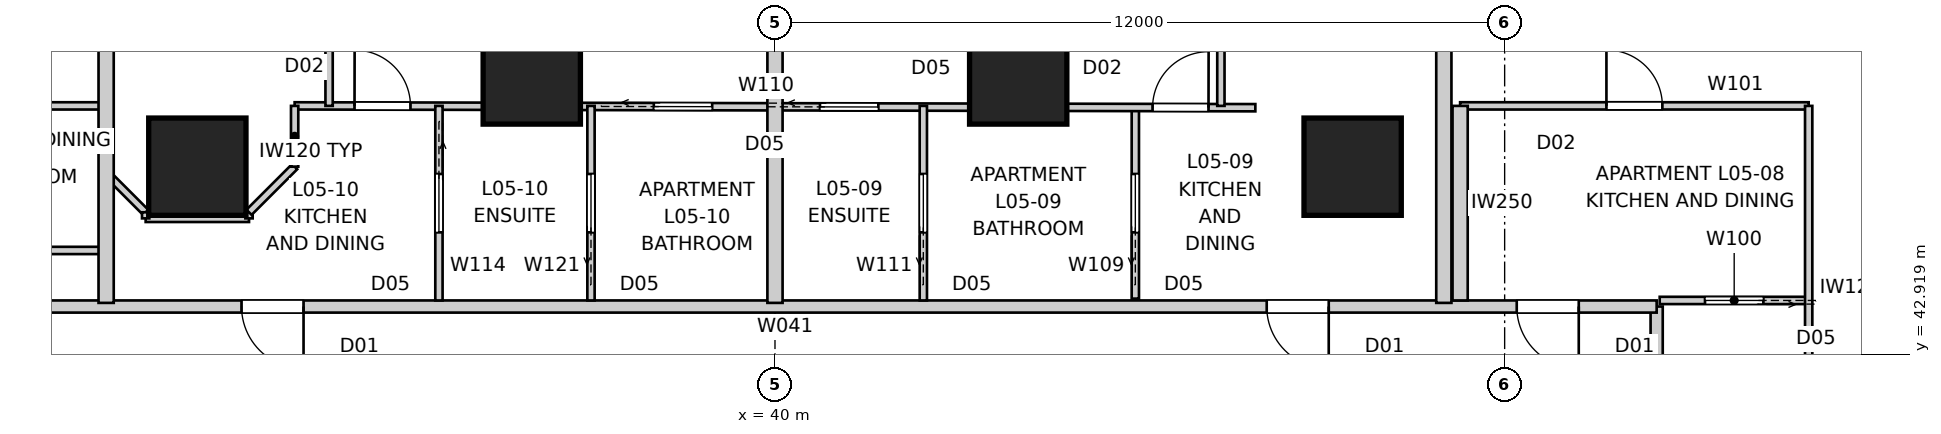
"""IFC4 building model, lengths in metres.
Left out: names, types, materials, properties, quantities, classifications, styles, units other than length and angle.
Written with IfcOpenShell. Run it as: python <this file> out.ifc"""

import sys

from ifc_helpers import new_model, si_unit, direction, frame, frame_2d, origin, origin_2d, place, context, subcontext, project, spatial, rectangle, extrude, element, fill, save


model = new_model("IFC4")
c1 = context("Model", 3, precision=1e-05, world=origin(), true_north=direction((0.0, 1.0)))
c2 = subcontext(c1, "Body", "Model", "MODEL_VIEW")
j1 = project(units=[si_unit("LENGTHUNIT", "METRE"), si_unit("PLANEANGLEUNIT", "RADIAN")], contexts=[c1])
p1 = place(None, origin())
s1 = spatial("IfcSite", under=j1, at=p1, CompositionType="ELEMENT")
p2 = place(p1, origin())
s2 = spatial("IfcBuilding", under=s1, at=p2, CompositionType="ELEMENT")
p3 = place(p2, frame((0.0, 0.0, 21.8)))
s3 = spatial("IfcBuildingStorey", under=s2, at=p3, CompositionType="ELEMENT", Elevation=21.8)
for number, where, z_axis, x_axis in (
    (1, (49.5, 46.0, 0.0), (0.0, 0.0, 1.0), (1.0, 0.0, 0.0)),
    (2, (44.0, 47.5, 0.0), (0.0, 0.0, 1.0), (1.0, 0.0, 0.0)),
    (3, (36.0, 47.5, 0.0), (0.0, 0.0, 1.0), (1.0, 0.0, 0.0)),
    (4, (30.5, 46.0, 0.0), (0.0, 0.0, 1.0), (1.0, 0.0, 0.0)),
):
    element("IfcColumn", number, at=place(p3, frame(where, z_axis=z_axis, x_axis=x_axis)), inside=s3, PredefinedType="COLUMN", context=c2, shape_type="SweptSolid", body=[
        extrude(rectangle(XDim=1.6, YDim=1.6, at=origin_2d()), origin(), (0.0, 0.0, 1.0), 3.4),
    ])
p4 = place(p3, frame((54.5, 16.3, 0.0), z_axis=(0.0, 0.0, 1.0), x_axis=(0.0, 1.0, 0.0)))
e5 = element("IfcWall", 5, at=p4, inside=s3, PredefinedType="PARTITIONING", context=c2, shape_type="SweptSolid", body=[
    extrude(rectangle(XDim=27.4, YDim=0.2, at=frame_2d((13.7, 0.0))), origin(), (0.0, 0.0, 1.0), 3.25),
])
p5 = place(p4, frame((20.998, 0.0, 0.0)))
e6 = element("IfcOpeningElement", 6, at=p5, cuts=e5, PredefinedType="OPENING", context=c2, shape_type="SweptSolid", body=[
    extrude(rectangle(XDim=1.02, YDim=2.34, at=frame_2d((0.51, 1.17))), frame((0.0, 0.11, 0.0), z_axis=(0.0, -1.0, 0.0), x_axis=(1.0, 0.0, 0.0)), (0.0, 0.0, 1.0), 0.22),
])
p6 = place(p4, frame((11.119, 0.0, 0.0)))
e7 = element("IfcOpeningElement", 7, at=p6, cuts=e5, PredefinedType="OPENING", context=c2, shape_type="SweptSolid", body=[
    extrude(rectangle(XDim=1.02, YDim=2.34, at=frame_2d((0.51, 1.17))), frame((0.0, 0.11, 0.0), z_axis=(0.0, -1.0, 0.0), x_axis=(1.0, 0.0, 0.0)), (0.0, 0.0, 1.0), 0.22),
])
p7 = place(p4, frame((1.015, 0.0, 0.0)))
e8 = element("IfcOpeningElement", 8, at=p7, cuts=e5, PredefinedType="OPENING", context=c2, shape_type="SweptSolid", body=[
    extrude(rectangle(XDim=1.02, YDim=2.34, at=frame_2d((0.51, 1.17))), frame((0.0, 0.11, 0.0), z_axis=(0.0, -1.0, 0.0), x_axis=(1.0, 0.0, 0.0)), (0.0, 0.0, 1.0), 0.22),
])
p8 = place(p3, frame((54.5, 43.7, 0.0), z_axis=(0.0, 0.0, 1.0), x_axis=(-1.0, 0.0, 0.0)))
e9 = element("IfcWall", 9, at=p8, inside=s3, PredefinedType="PARTITIONING", context=c2, shape_type="SweptSolid", body=[
    extrude(rectangle(XDim=29.0, YDim=0.2, at=frame_2d((14.5, 0.0))), origin(), (0.0, 0.0, 1.0), 3.25),
])
p9 = place(p8, frame((22.253, 0.0, 0.0)))
e10 = element("IfcOpeningElement", 10, at=p9, cuts=e9, PredefinedType="OPENING", context=c2, shape_type="SweptSolid", body=[
    extrude(rectangle(XDim=1.02, YDim=2.34, at=frame_2d((0.51, 1.17))), frame((0.0, 0.11, 0.0), z_axis=(0.0, -1.0, 0.0), x_axis=(1.0, 0.0, 0.0)), (0.0, 0.0, 1.0), 0.22),
])
p10 = place(p8, frame((5.393, 0.0, 0.0)))
e11 = element("IfcOpeningElement", 11, at=p10, cuts=e9, PredefinedType="OPENING", context=c2, shape_type="SweptSolid", body=[
    extrude(rectangle(XDim=1.02, YDim=2.34, at=frame_2d((0.51, 1.17))), frame((0.0, 0.11, 0.0), z_axis=(0.0, -1.0, 0.0), x_axis=(1.0, 0.0, 0.0)), (0.0, 0.0, 1.0), 0.22),
])
p11 = place(p8, frame((1.281, 0.0, 0.0)))
e12 = element("IfcOpeningElement", 12, at=p11, cuts=e9, PredefinedType="OPENING", context=c2, shape_type="SweptSolid", body=[
    extrude(rectangle(XDim=1.02, YDim=2.34, at=frame_2d((0.51, 1.17))), frame((0.0, 0.11, 0.0), z_axis=(0.0, -1.0, 0.0), x_axis=(1.0, 0.0, 0.0)), (0.0, 0.0, 1.0), 0.22),
])
for number, where, z_axis, x_axis in (
    (13, (51.0, 56.0, 0.0), (0.0, 0.0, 1.0), (0.0, -1.0, 0.0)),
    (14, (29.0, 56.0, 0.0), (0.0, 0.0, 1.0), (0.0, -1.0, 0.0)),
):
    element("IfcWall", number, at=place(p3, frame(where, z_axis=z_axis, x_axis=x_axis)), inside=s3, PredefinedType="PARTITIONING", context=c2, shape_type="SweptSolid", body=[
        extrude(rectangle(XDim=12.24, YDim=0.25, at=frame_2d((6.12, 0.0))), origin(), (0.0, 0.0, 1.0), 3.25),
    ])
p12 = place(p3, frame((40.0, 56.0, 0.0), z_axis=(0.0, 0.0, 1.0), x_axis=(0.0, -1.0, 0.0)))
e15 = element("IfcWall", 15, at=p12, inside=s3, PredefinedType="PARTITIONING", context=c2, shape_type="SweptSolid", body=[
    extrude(rectangle(XDim=8.5, YDim=0.25, at=frame_2d((4.25, 0.0))), origin(), (0.0, 0.0, 1.0), 3.25),
])
p13 = place(p3, frame((40.0, 47.5, 0.0), z_axis=(0.0, 0.0, 1.0), x_axis=(0.0, -1.0, 0.0)))
e16 = element("IfcWall", 16, at=p13, inside=s3, PredefinedType="PARTITIONING", context=c2, shape_type="SweptSolid", body=[
    extrude(rectangle(XDim=3.74, YDim=0.25, at=frame_2d((1.87, 0.0))), origin(), (0.0, 0.0, 1.0), 2.796),
])
p14 = place(p3, frame((57.0, 43.8, 0.0), z_axis=(0.0, 0.0, 1.0), x_axis=(-1.0, 0.0, 0.0)))
e17 = element("IfcWall", 17, at=p14, inside=s3, PredefinedType="PARTITIONING", context=c2, shape_type="SweptSolid", body=[
    extrude(rectangle(XDim=2.45, YDim=0.12, at=frame_2d((1.225, 0.0))), origin(), (0.0, 0.0, 1.0), 3.25),
])
p15 = place(p14, frame((0.745, 0.0, 0.0)))
e18 = element("IfcOpeningElement", 18, at=p15, cuts=e17, PredefinedType="OPENING", context=c2, shape_type="SweptSolid", body=[
    extrude(rectangle(XDim=0.96, YDim=2.1, at=frame_2d((0.48, 1.05))), frame((0.0, 0.07, 0.0), z_axis=(0.0, -1.0, 0.0), x_axis=(1.0, 0.0, 0.0)), (0.0, 0.0, 1.0), 0.14),
])
p16 = place(p3, frame((51.268, 47.0, 0.0), z_axis=(0.0, 0.0, 1.0), x_axis=(1.0, 0.0, 0.0)))
e19 = element("IfcWall", 19, at=p16, inside=s3, PredefinedType="PARTITIONING", context=c2, shape_type="SweptSolid", body=[
    extrude(rectangle(XDim=5.732, YDim=0.12, at=frame_2d((2.866, 0.0))), origin(), (0.0, 0.0, 1.0), 3.25),
])
p17 = place(p16, frame((2.406, 0.0, 0.0)))
e20 = element("IfcOpeningElement", 20, at=p17, cuts=e19, PredefinedType="OPENING", context=c2, shape_type="SweptSolid", body=[
    extrude(rectangle(XDim=0.92, YDim=2.34, at=frame_2d((0.46, 1.17))), frame((0.0, 0.07, 0.0), z_axis=(0.0, -1.0, 0.0), x_axis=(1.0, 0.0, 0.0)), (0.0, 0.0, 1.0), 0.14),
])
p18 = place(p3, frame((57.0, 47.0, 0.0), z_axis=(0.0, 0.0, 1.0), x_axis=(0.0, -1.0, 0.0)))
e21 = element("IfcWall", 21, at=p18, inside=s3, PredefinedType="PARTITIONING", context=c2, shape_type="SweptSolid", body=[
    extrude(rectangle(XDim=6.0, YDim=0.12, at=frame_2d((3.0, 0.0))), origin(), (0.0, 0.0, 1.0), 3.25),
])
p19 = place(p3, frame((51.268, 43.8, 0.0), z_axis=(0.0, 0.0, 1.0), x_axis=(0.0, 1.0, 0.0)))
e22 = element("IfcWall", 22, at=p19, inside=s3, PredefinedType="PARTITIONING", context=c2, shape_type="SweptSolid", body=[
    extrude(rectangle(XDim=3.2, YDim=0.25, at=frame_2d((1.6, 0.0))), origin(), (0.0, 0.0, 1.0), 3.25),
])
p20 = place(p3, frame((45.926, 43.83, 0.0), z_axis=(0.0, 0.0, 1.0), x_axis=(0.0, 1.0, 0.0)))
e23 = element("IfcWall", 23, at=p20, inside=s3, PredefinedType="PARTITIONING", context=c2, shape_type="SweptSolid", body=[
    extrude(rectangle(XDim=3.14, YDim=0.12, at=frame_2d((1.57, 0.0))), origin(), (0.0, 0.0, 1.0), 3.25),
])
p21 = place(p20, frame((1.09, 0.0, 0.0)))
e24 = element("IfcOpeningElement", 24, at=p21, cuts=e23, PredefinedType="OPENING", context=c2, shape_type="SweptSolid", body=[
    extrude(rectangle(XDim=0.96, YDim=2.1, at=frame_2d((0.48, 1.05))), frame((0.0, 0.07, 0.0), z_axis=(0.0, -1.0, 0.0), x_axis=(1.0, 0.0, 0.0)), (0.0, 0.0, 1.0), 0.14),
])
p22 = place(p3, frame((32.1, 47.0, 0.0), z_axis=(0.0, 0.0, 1.0), x_axis=(0.999998193842, -0.001900608472, 0.0)))
e25 = element("IfcWall", 25, at=p22, inside=s3, PredefinedType="PARTITIONING", context=c2, shape_type="SweptSolid", body=[
    extrude(rectangle(XDim=15.8, YDim=0.12, at=frame_2d((7.9, 0.0))), origin(), (0.0, 0.0, 1.0), 2.549),
])
p23 = place(p22, frame((0.985, 0.0, 0.0)))
e26 = element("IfcOpeningElement", 26, at=p23, cuts=e25, PredefinedType="OPENING", context=c2, shape_type="SweptSolid", body=[
    extrude(rectangle(XDim=0.92, YDim=2.34, at=frame_2d((0.46, 1.17))), frame((0.0, 0.07, 0.0), z_axis=(0.0, -1.0, 0.0), x_axis=(1.0, 0.0, 0.0)), (0.0, 0.0, 1.0), 0.14),
])
p24 = place(p22, frame((14.11, 0.0, 0.0)))
e27 = element("IfcOpeningElement", 27, at=p24, cuts=e25, PredefinedType="OPENING", context=c2, shape_type="SweptSolid", body=[
    extrude(rectangle(XDim=0.92, YDim=2.34, at=frame_2d((0.46, 1.17))), frame((0.0, 0.07, 0.0), z_axis=(0.0, -1.0, 0.0), x_axis=(1.0, 0.0, 0.0)), (0.0, 0.0, 1.0), 0.14),
])
p25 = place(p22, frame((5.907, 0.0, 0.0)))
e28 = element("IfcOpeningElement", 28, at=p25, cuts=e25, PredefinedType="OPENING", context=c2, shape_type="SweptSolid", body=[
    extrude(rectangle(XDim=0.96, YDim=2.1, at=frame_2d((0.48, 1.05))), frame((0.0, 0.07, 0.0), z_axis=(0.0, -1.0, 0.0), x_axis=(1.0, 0.0, 0.0)), (0.0, 0.0, 1.0), 0.14),
])
p26 = place(p22, frame((8.64, 0.0, 0.0)))
e29 = element("IfcOpeningElement", 29, at=p26, cuts=e25, PredefinedType="OPENING", context=c2, shape_type="SweptSolid", body=[
    extrude(rectangle(XDim=0.96, YDim=2.1, at=frame_2d((0.48, 1.05))), frame((0.0, 0.07, 0.0), z_axis=(0.0, -1.0, 0.0), x_axis=(1.0, 0.0, 0.0)), (0.0, 0.0, 1.0), 0.14),
])
p27 = place(p3, frame((42.44, 43.8, 0.0), z_axis=(0.0, 0.0, 1.0), x_axis=(0.0, 1.0, 0.0)))
e30 = element("IfcWall", 30, at=p27, inside=s3, PredefinedType="PARTITIONING", context=c2, shape_type="SweptSolid", body=[
    extrude(rectangle(XDim=3.2, YDim=0.12, at=frame_2d((1.6, 0.0))), origin(), (0.0, 0.0, 1.0), 3.25),
])
p28 = place(p27, frame((1.12, 0.0, 0.0)))
e31 = element("IfcOpeningElement", 31, at=p28, cuts=e30, PredefinedType="OPENING", context=c2, shape_type="SweptSolid", body=[
    extrude(rectangle(XDim=0.96, YDim=2.1, at=frame_2d((0.48, 1.05))), frame((0.0, 0.07, 0.0), z_axis=(0.0, -1.0, 0.0), x_axis=(1.0, 0.0, 0.0)), (0.0, 0.0, 1.0), 0.14),
])
p29 = place(p3, frame((47.333, 47.0, 0.0), z_axis=(0.0, 0.0, 1.0), x_axis=(0.0, 1.0, 0.0)))
e32 = element("IfcWall", 32, at=p29, inside=s3, PredefinedType="PARTITIONING", context=c2, shape_type="SweptSolid", body=[
    extrude(rectangle(XDim=8.96, YDim=0.12, at=frame_2d((4.48, 0.0))), origin(), (0.0, 0.0, 1.0), 3.25),
])
p30 = place(p29, frame((4.04, 0.0, 0.0)))
e33 = element("IfcOpeningElement", 33, at=p30, cuts=e32, PredefinedType="OPENING", context=c2, shape_type="SweptSolid", body=[
    extrude(rectangle(XDim=0.92, YDim=2.34, at=frame_2d((0.46, 1.17))), frame((0.0, 0.07, 0.0), z_axis=(0.0, -1.0, 0.0), x_axis=(1.0, 0.0, 0.0)), (0.0, 0.0, 1.0), 0.14),
])
p31 = place(p3, frame((43.667, 55.96, 0.0), z_axis=(0.0, 0.0, 1.0), x_axis=(0.0, -1.0, 0.0)))
e34 = element("IfcWall", 34, at=p31, inside=s3, PredefinedType="PARTITIONING", context=c2, shape_type="SweptSolid", body=[
    extrude(rectangle(XDim=8.96, YDim=0.12, at=frame_2d((4.48, 0.0))), origin(), (0.0, 0.0, 1.0), 3.25),
])
p32 = place(p3, frame((34.473, 47.0, 0.0), z_axis=(0.0, 0.0, 1.0), x_axis=(0.0, -1.0, 0.0)))
e35 = element("IfcWall", 35, at=p32, inside=s3, PredefinedType="PARTITIONING", context=c2, shape_type="SweptSolid", body=[
    extrude(rectangle(XDim=3.2, YDim=0.12, at=frame_2d((1.6, 0.0))), origin(), (0.0, 0.0, 1.0), 3.25),
])
p33 = place(p32, frame((1.12, 0.0, 0.0)))
e36 = element("IfcOpeningElement", 36, at=p33, cuts=e35, PredefinedType="OPENING", context=c2, shape_type="SweptSolid", body=[
    extrude(rectangle(XDim=0.96, YDim=2.1, at=frame_2d((0.48, 1.05))), frame((0.0, 0.07, 0.0), z_axis=(0.0, -1.0, 0.0), x_axis=(1.0, 0.0, 0.0)), (0.0, 0.0, 1.0), 0.14),
])
p34 = place(p3, frame((29.0, 45.9, 0.0), z_axis=(0.0, 0.0, 1.0), x_axis=(0.707106781187, -0.707106781187, 0.0)))
e37 = element("IfcWall", 37, at=p34, inside=s3, PredefinedType="PARTITIONING", context=c2, shape_type="SweptSolid", body=[
    extrude(rectangle(XDim=0.919, YDim=0.12, at=frame_2d((0.459, 0.0))), origin(), (0.0, 0.0, 1.0), 3.25),
])
p35 = place(p3, frame((29.65, 45.15, 0.0), z_axis=(0.0, 0.0, 1.0), x_axis=(1.0, 0.0, 0.0)))
e38 = element("IfcWall", 38, at=p35, inside=s3, PredefinedType="PARTITIONING", context=c2, shape_type="SweptSolid", body=[
    extrude(rectangle(XDim=1.7, YDim=0.12, at=frame_2d((0.85, 0.0))), origin(), (0.0, 0.0, 1.0), 3.25),
])
p36 = place(p3, frame((31.35, 45.25, 0.0), z_axis=(0.0, 0.0, 1.0), x_axis=(0.707106781187, 0.707106781187, 0.0)))
e39 = element("IfcWall", 39, at=p36, inside=s3, PredefinedType="PARTITIONING", context=c2, shape_type="SweptSolid", body=[
    extrude(rectangle(XDim=1.061, YDim=0.12, at=frame_2d((0.53, 0.0))), origin(), (0.0, 0.0, 1.0), 3.25),
])
p37 = place(p3, frame((32.1, 46.0, 0.0), z_axis=(0.0, 0.0, 1.0), x_axis=(0.0, 1.0, 0.0)))
e40 = element("IfcWall", 40, at=p37, inside=s3, PredefinedType="PARTITIONING", context=c2, shape_type="SweptSolid", body=[
    extrude(rectangle(XDim=1.0, YDim=0.12, at=frame_2d((0.5, 0.0))), origin(), (0.0, 0.0, 1.0), 3.25),
])
p38 = place(p3, frame((36.974, 43.8, 0.0), z_axis=(0.0, 0.0, 1.0), x_axis=(0.0, 1.0, 0.0)))
e41 = element("IfcWall", 41, at=p38, inside=s3, PredefinedType="PARTITIONING", context=c2, shape_type="SweptSolid", body=[
    extrude(rectangle(XDim=3.2, YDim=0.12, at=frame_2d((1.6, 0.0))), origin(), (0.0, 0.0, 1.0), 3.25),
])
p39 = place(p38, frame((1.12, 0.0, 0.0)))
e42 = element("IfcOpeningElement", 42, at=p39, cuts=e41, PredefinedType="OPENING", context=c2, shape_type="SweptSolid", body=[
    extrude(rectangle(XDim=0.96, YDim=2.1, at=frame_2d((0.48, 1.05))), frame((0.0, 0.07, 0.0), z_axis=(0.0, -1.0, 0.0), x_axis=(1.0, 0.0, 0.0)), (0.0, 0.0, 1.0), 0.14),
])
p40 = place(p3, frame((36.333, 47.0, 0.0), z_axis=(0.0, 0.0, 1.0), x_axis=(0.0, 1.0, 0.0)))
e43 = element("IfcWall", 43, at=p40, inside=s3, PredefinedType="PARTITIONING", context=c2, shape_type="SweptSolid", body=[
    extrude(rectangle(XDim=8.96, YDim=0.12, at=frame_2d((4.48, 0.0))), origin(), (0.0, 0.0, 1.0), 3.25),
])
p41 = place(p3, frame((32.667, 55.96, 0.0), z_axis=(0.0, 0.0, 1.0), x_axis=(0.0, -1.0, 0.0)))
e44 = element("IfcWall", 44, at=p41, inside=s3, PredefinedType="PARTITIONING", context=c2, shape_type="SweptSolid", body=[
    extrude(rectangle(XDim=8.96, YDim=0.12, at=frame_2d((4.48, 0.0))), origin(), (0.0, 0.0, 1.0), 3.25),
])
p42 = place(p41, frame((4.0, 0.0, 0.0)))
e45 = element("IfcOpeningElement", 45, at=p42, cuts=e44, PredefinedType="OPENING", context=c2, shape_type="SweptSolid", body=[
    extrude(rectangle(XDim=0.92, YDim=2.34, at=frame_2d((0.46, 1.17))), frame((0.0, 0.07, 0.0), z_axis=(0.0, -1.0, 0.0), x_axis=(1.0, 0.0, 0.0)), (0.0, 0.0, 1.0), 0.14),
])
p43 = place(p3, frame((23.0, 44.622, 0.0), z_axis=(0.0, 0.0, 1.0), x_axis=(1.0, 0.0, 0.0)))
e46 = element("IfcWall", 46, at=p43, inside=s3, PredefinedType="PARTITIONING", context=c2, shape_type="SweptSolid", body=[
    extrude(rectangle(XDim=6.0, YDim=0.12, at=frame_2d((3.0, 0.0))), origin(), (0.0, 0.0, 1.0), 2.638),
])
p44 = place(p43, frame((1.47, 0.0, 0.0)))
e47 = element("IfcOpeningElement", 47, at=p44, cuts=e46, PredefinedType="OPENING", context=c2, shape_type="SweptSolid", body=[
    extrude(rectangle(XDim=0.96, YDim=2.1, at=frame_2d((0.48, 1.05))), frame((0.0, 0.07, 0.0), z_axis=(0.0, -1.0, 0.0), x_axis=(1.0, 0.0, 0.0)), (0.0, 0.0, 1.0), 0.14),
])
p45 = place(p3, frame((23.0, 47.0, 0.0), z_axis=(0.0, 0.0, 1.0), x_axis=(1.0, 0.0, 0.0)))
e48 = element("IfcWall", 48, at=p45, inside=s3, PredefinedType="PARTITIONING", context=c2, shape_type="SweptSolid", body=[
    extrude(rectangle(XDim=6.0, YDim=0.12, at=frame_2d((3.0, 0.0))), origin(), (0.0, 0.0, 1.0), 3.25),
])
for number, where, z_axis, x_axis in (
    (49, (29.65, 45.15, 0.0), (0.0, 0.0, 1.0), (0.0, 1.0, 0.0)),
    (50, (31.35, 45.15, 0.0), (0.0, 0.0, 1.0), (0.0, 1.0, 0.0)),
):
    element("IfcWall", number, at=place(p3, frame(where, z_axis=z_axis, x_axis=x_axis)), inside=s3, PredefinedType="PARTITIONING", context=c2, shape_type="SweptSolid", body=[
        extrude(rectangle(XDim=0.1, YDim=0.12, at=frame_2d((0.05, 0.0))), origin(), (0.0, 0.0, 1.0), 3.25),
    ])
p46 = place(p9, origin())
e51 = element("IfcDoor", 51, at=p46, inside=s3, OperationType="SINGLE_SWING_LEFT", PredefinedType="DOOR", context=c2, shape_type="SweptSolid", body=[
    extrude(rectangle(XDim=1.02, YDim=2.34, at=frame_2d((0.51, 1.17))), frame((0.0, 0.025, 0.0), z_axis=(0.0, -1.0, 0.0), x_axis=(1.0, 0.0, 0.0)), (0.0, 0.0, 1.0), 0.05),
])
fill(e10, e51)
p47 = place(p10, origin())
e52 = element("IfcDoor", 52, at=p47, inside=s3, OperationType="SINGLE_SWING_LEFT", PredefinedType="DOOR", context=c2, shape_type="SweptSolid", body=[
    extrude(rectangle(XDim=1.02, YDim=2.34, at=frame_2d((0.51, 1.17))), frame((0.0, 0.025, 0.0), z_axis=(0.0, -1.0, 0.0), x_axis=(1.0, 0.0, 0.0)), (0.0, 0.0, 1.0), 0.05),
])
fill(e11, e52)
p48 = place(p11, origin())
e53 = element("IfcDoor", 53, at=p48, inside=s3, OperationType="SINGLE_SWING_LEFT", PredefinedType="DOOR", context=c2, shape_type="SweptSolid", body=[
    extrude(rectangle(XDim=1.02, YDim=2.34, at=frame_2d((0.51, 1.17))), frame((0.0, 0.025, 0.0), z_axis=(0.0, -1.0, 0.0), x_axis=(1.0, 0.0, 0.0)), (0.0, 0.0, 1.0), 0.05),
])
fill(e12, e53)
p49 = place(p33, origin())
e54 = element("IfcDoor", 54, at=p49, inside=s3, OperationType="SLIDING_TO_LEFT", PredefinedType="DOOR", context=c2, shape_type="SweptSolid", body=[
    extrude(rectangle(XDim=0.96, YDim=2.1, at=frame_2d((0.48, 1.05))), frame((0.0, 0.025, 0.0), z_axis=(0.0, -1.0, 0.0), x_axis=(1.0, 0.0, 0.0)), (0.0, 0.0, 1.0), 0.05),
])
fill(e36, e54)
p50 = place(p23, origin())
e55 = element("IfcDoor", 55, at=p50, inside=s3, OperationType="SINGLE_SWING_LEFT", PredefinedType="DOOR", context=c2, shape_type="SweptSolid", body=[
    extrude(rectangle(XDim=0.92, YDim=2.34, at=frame_2d((0.46, 1.17))), frame((0.0, 0.025, 0.0), z_axis=(0.0, -1.0, 0.0), x_axis=(1.0, 0.0, 0.0)), (0.0, 0.0, 1.0), 0.05),
])
fill(e26, e55)
p51 = place(p21, origin())
e56 = element("IfcDoor", 56, at=p51, inside=s3, OperationType="SLIDING_TO_LEFT", PredefinedType="DOOR", context=c2, shape_type="SweptSolid", body=[
    extrude(rectangle(XDim=0.96, YDim=2.1, at=frame_2d((0.48, 1.05))), frame((0.0, 0.025, 0.0), z_axis=(0.0, -1.0, 0.0), x_axis=(1.0, 0.0, 0.0)), (0.0, 0.0, 1.0), 0.05),
])
fill(e24, e56)
p52 = place(p24, origin())
e57 = element("IfcDoor", 57, at=p52, inside=s3, OperationType="SINGLE_SWING_RIGHT", PredefinedType="DOOR", context=c2, shape_type="SweptSolid", body=[
    extrude(rectangle(XDim=0.92, YDim=2.34, at=frame_2d((0.46, 1.17))), frame((0.0, 0.025, 0.0), z_axis=(0.0, -1.0, 0.0), x_axis=(1.0, 0.0, 0.0)), (0.0, 0.0, 1.0), 0.05),
])
fill(e27, e57)
p53 = place(p17, origin())
e58 = element("IfcDoor", 58, at=p53, inside=s3, OperationType="SINGLE_SWING_LEFT", PredefinedType="DOOR", context=c2, shape_type="SweptSolid", body=[
    extrude(rectangle(XDim=0.92, YDim=2.34, at=frame_2d((0.46, 1.17))), frame((0.0, 0.025, 0.0), z_axis=(0.0, -1.0, 0.0), x_axis=(1.0, 0.0, 0.0)), (0.0, 0.0, 1.0), 0.05),
])
fill(e20, e58)
p54 = place(p15, origin())
e59 = element("IfcDoor", 59, at=p54, inside=s3, OperationType="SLIDING_TO_LEFT", PredefinedType="DOOR", context=c2, shape_type="SweptSolid", body=[
    extrude(rectangle(XDim=0.96, YDim=2.1, at=frame_2d((0.48, 1.05))), frame((0.0, 0.025, 0.0), z_axis=(0.0, -1.0, 0.0), x_axis=(1.0, 0.0, 0.0)), (0.0, 0.0, 1.0), 0.05),
])
fill(e18, e59)
p55 = place(p39, origin())
e60 = element("IfcDoor", 60, at=p55, inside=s3, OperationType="SLIDING_TO_LEFT", PredefinedType="DOOR", context=c2, shape_type="SweptSolid", body=[
    extrude(rectangle(XDim=0.96, YDim=2.1, at=frame_2d((0.48, 1.05))), frame((0.0, 0.025, 0.0), z_axis=(0.0, -1.0, 0.0), x_axis=(1.0, 0.0, 0.0)), (0.0, 0.0, 1.0), 0.05),
])
fill(e42, e60)
p56 = place(p28, origin())
e61 = element("IfcDoor", 61, at=p56, inside=s3, OperationType="SLIDING_TO_LEFT", PredefinedType="DOOR", context=c2, shape_type="SweptSolid", body=[
    extrude(rectangle(XDim=0.96, YDim=2.1, at=frame_2d((0.48, 1.05))), frame((0.0, 0.025, 0.0), z_axis=(0.0, -1.0, 0.0), x_axis=(1.0, 0.0, 0.0)), (0.0, 0.0, 1.0), 0.05),
])
fill(e31, e61)
p57 = place(p25, origin())
e62 = element("IfcDoor", 62, at=p57, inside=s3, OperationType="SLIDING_TO_LEFT", PredefinedType="DOOR", context=c2, shape_type="SweptSolid", body=[
    extrude(rectangle(XDim=0.96, YDim=2.1, at=frame_2d((0.48, 1.05))), frame((0.0, 0.025, 0.0), z_axis=(0.0, -1.0, 0.0), x_axis=(1.0, 0.0, 0.0)), (0.0, 0.0, 1.0), 0.05),
])
fill(e28, e62)
p58 = place(p26, origin())
e63 = element("IfcDoor", 63, at=p58, inside=s3, OperationType="SLIDING_TO_LEFT", PredefinedType="DOOR", context=c2, shape_type="SweptSolid", body=[
    extrude(rectangle(XDim=0.96, YDim=2.1, at=frame_2d((0.48, 1.05))), frame((0.0, 0.025, 0.0), z_axis=(0.0, -1.0, 0.0), x_axis=(1.0, 0.0, 0.0)), (0.0, 0.0, 1.0), 0.05),
])
fill(e29, e63)
save(model, sys.argv[1])
